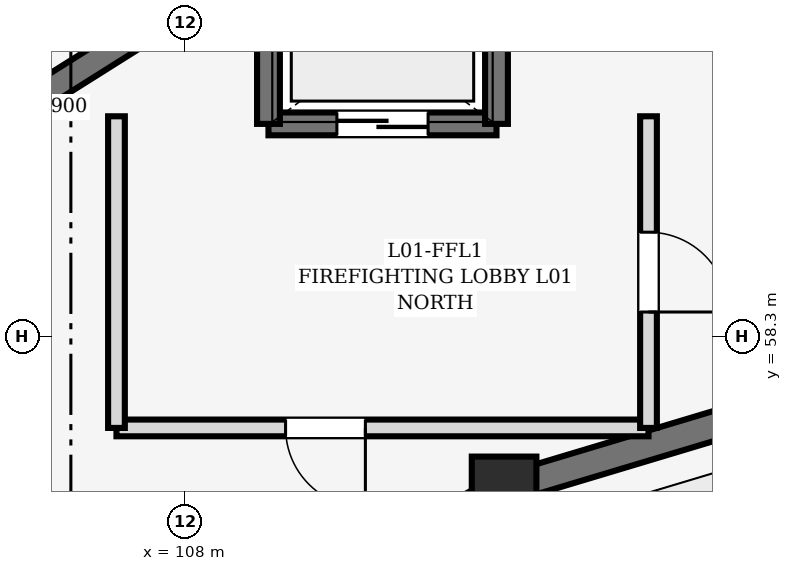
"""IFC4 building model, lengths in metres.
Left out: names, types, materials, properties, quantities, classifications, styles, units other than length and angle.
Written with IfcOpenShell. Run it as: python <this file> out.ifc"""

import sys

from ifc_helpers import new_model, si_unit, direction, frame, frame_2d, origin, origin_2d, place, context, subcontext, project, spatial, rectangle, extrude, element, fill, save


model = new_model("IFC4")
c1 = context("Model", 3, precision=1e-05, world=origin(), true_north=direction((0.0, 1.0)))
c2 = subcontext(c1, "Body", "Model", "MODEL_VIEW")
j1 = project(units=[si_unit("LENGTHUNIT", "METRE"), si_unit("PLANEANGLEUNIT", "RADIAN")], contexts=[c1])
p1 = place(None, origin())
s1 = spatial("IfcSite", under=j1, at=p1, CompositionType="ELEMENT")
p2 = place(p1, origin())
s2 = spatial("IfcBuilding", under=s1, at=p2, CompositionType="ELEMENT")
p3 = place(p2, origin())
s3 = spatial("IfcBuildingStorey", under=s2, at=p3, CompositionType="ELEMENT", Elevation=0.0)
p4 = place(p3, frame((112.2, 56.298, 0.0), z_axis=(0.0, 0.0, 1.0), x_axis=(1.0, 0.0, 0.0)))
e1 = element("IfcColumn", 1, at=p4, inside=s3, PredefinedType="COLUMN", context=c2, shape_type="SweptSolid", body=[
    extrude(rectangle(XDim=0.85, YDim=0.85, at=origin_2d()), origin(), (0.0, 0.0, 1.0), 5.4),
])
p5 = place(p3, frame((116.774, 57.67, 0.0), z_axis=(0.0, 0.0, 1.0), x_axis=(-0.957804976592, -0.287418904764, 0.0)))
e2 = element("IfcWall", 2, at=p5, inside=s3, PredefinedType="SOLIDWALL", context=c2, shape_type="SweptSolid", body=[
    extrude(rectangle(XDim=4.415, YDim=0.38, at=frame_2d((2.208, 0.0))), origin(), (0.0, 0.0, 1.0), 5.12),
])
p6 = place(p3, frame((111.885, 56.123, 0.0), z_axis=(0.0, 0.0, 1.0), x_axis=(-0.874000773635, -0.485924528795, 0.0)))
e3 = element("IfcWall", 3, at=p6, inside=s3, PredefinedType="SOLIDWALL", context=c2, shape_type="SweptSolid", body=[
    extrude(rectangle(XDim=3.975, YDim=0.38, at=frame_2d((1.987, 0.0))), origin(), (0.0, 0.0, 1.0), 5.12),
])
p7 = place(p3, frame((108.346, 62.893, 0.0), z_axis=(0.0, 0.0, 1.0), x_axis=(-0.846151979506, -0.532941673712, 0.0)))
e4 = element("IfcWall", 4, at=p7, inside=s3, PredefinedType="SHEAR", context=c2, shape_type="SweptSolid", body=[
    extrude(rectangle(XDim=5.9, YDim=0.35, at=frame_2d((2.95, 0.0))), origin(), (0.0, 0.0, 1.0), 5.12),
])
p8 = place(p3, frame((112.1, 61.1, 0.0), z_axis=(0.0, 0.0, 1.0), x_axis=(-1.0, 0.0, 0.0)))
e5 = element("IfcWall", 5, at=p8, inside=s3, PredefinedType="SHEAR", context=c2, shape_type="SweptSolid", body=[
    extrude(rectangle(XDim=3.0, YDim=0.3, at=frame_2d((1.5, 0.0))), origin(), (0.0, 0.0, 1.0), 5.14),
])
p9 = place(p8, frame((0.9, 0.0, 0.0)))
e6 = element("IfcOpeningElement", 6, at=p9, cuts=e5, PredefinedType="OPENING", context=c2, shape_type="SweptSolid", body=[
    extrude(rectangle(XDim=1.2, YDim=2.15, at=frame_2d((0.6, 1.075))), frame((0.0, 0.162, 0.0), z_axis=(0.0, -1.0, 0.0), x_axis=(1.0, 0.0, 0.0)), (0.0, 0.0, 1.0), 0.324),
])
p10 = place(p3, frame((112.1, 63.3, 0.0), z_axis=(0.0, 0.0, 1.0), x_axis=(0.0, -1.0, 0.0)))
e7 = element("IfcWall", 7, at=p10, inside=s3, PredefinedType="SHEAR", context=c2, shape_type="SweptSolid", body=[
    extrude(rectangle(XDim=2.2, YDim=0.3, at=frame_2d((1.1, 0.0))), origin(), (0.0, 0.0, 1.0), 5.14),
])
p11 = place(p3, frame((109.1, 61.1, 0.0), z_axis=(0.0, 0.0, 1.0), x_axis=(0.0, 1.0, 0.0)))
e8 = element("IfcWall", 8, at=p11, inside=s3, PredefinedType="SHEAR", context=c2, shape_type="SweptSolid", body=[
    extrude(rectangle(XDim=2.2, YDim=0.3, at=frame_2d((1.1, 0.0))), origin(), (0.0, 0.0, 1.0), 5.12),
])
p12 = place(p3, frame((114.1, 57.1, 0.0), z_axis=(0.0, 0.0, 1.0), x_axis=(-1.0, 0.0, 0.0)))
e9 = element("IfcWall", 9, at=p12, inside=s3, PredefinedType="SOLIDWALL", context=c2, shape_type="SweptSolid", body=[
    extrude(rectangle(XDim=7.0, YDim=0.22, at=frame_2d((3.5, 0.0))), origin(), (0.0, 0.0, 1.0), 5.125),
])
p13 = place(p12, frame((3.725, 0.0, 0.0)))
e10 = element("IfcOpeningElement", 10, at=p13, cuts=e9, PredefinedType="OPENING", context=c2, shape_type="SweptSolid", body=[
    extrude(rectangle(XDim=1.05, YDim=2.15, at=frame_2d((0.525, 1.075))), frame((0.0, 0.122, 0.0), z_axis=(0.0, -1.0, 0.0), x_axis=(1.0, 0.0, 0.0)), (0.0, 0.0, 1.0), 0.244),
])
p14 = place(p3, frame((107.1, 57.1, 0.0), z_axis=(0.0, 0.0, 1.0), x_axis=(0.0, 1.0, 0.0)))
e11 = element("IfcWall", 11, at=p14, inside=s3, PredefinedType="SOLIDWALL", context=c2, shape_type="SweptSolid", body=[
    extrude(rectangle(XDim=4.1, YDim=0.22, at=frame_2d((2.05, 0.0))), origin(), (0.0, 0.0, 1.0), 5.125),
])
p15 = place(p3, frame((114.1, 61.2, 0.0), z_axis=(0.0, 0.0, 1.0), x_axis=(0.0, -1.0, 0.0)))
e12 = element("IfcWall", 12, at=p15, inside=s3, PredefinedType="SOLIDWALL", context=c2, shape_type="SweptSolid", body=[
    extrude(rectangle(XDim=4.1, YDim=0.22, at=frame_2d((2.05, 0.0))), origin(), (0.0, 0.0, 1.0), 5.125),
])
p16 = place(p15, frame((1.525, 0.0, 0.0)))
e13 = element("IfcOpeningElement", 13, at=p16, cuts=e12, PredefinedType="OPENING", context=c2, shape_type="SweptSolid", body=[
    extrude(rectangle(XDim=1.05, YDim=2.15, at=frame_2d((0.525, 1.075))), frame((0.0, 0.122, 0.0), z_axis=(0.0, -1.0, 0.0), x_axis=(1.0, 0.0, 0.0)), (0.0, 0.0, 1.0), 0.244),
])
p17 = place(p9, origin())
e14 = element("IfcDoor", 14, at=p17, inside=s3, OperationType="DOUBLE_DOOR_SLIDING", PredefinedType="DOOR", context=c2, shape_type="SweptSolid", body=[
    extrude(rectangle(XDim=1.2, YDim=2.15, at=frame_2d((0.6, 1.075))), frame((0.0, 0.025, 0.0), z_axis=(0.0, -1.0, 0.0), x_axis=(1.0, 0.0, 0.0)), (0.0, 0.0, 1.0), 0.05),
])
fill(e6, e14)
p18 = place(p13, origin())
e15 = element("IfcDoor", 15, at=p18, inside=s3, OperationType="SINGLE_SWING_LEFT", PredefinedType="DOOR", context=c2, shape_type="SweptSolid", body=[
    extrude(rectangle(XDim=1.05, YDim=2.15, at=frame_2d((0.525, 1.075))), frame((0.0, 0.025, 0.0), z_axis=(0.0, -1.0, 0.0), x_axis=(1.0, 0.0, 0.0)), (0.0, 0.0, 1.0), 0.05),
])
fill(e10, e15)
p19 = place(p16, origin())
e16 = element("IfcDoor", 16, at=p19, inside=s3, OperationType="SINGLE_SWING_RIGHT", PredefinedType="DOOR", context=c2, shape_type="SweptSolid", body=[
    extrude(rectangle(XDim=1.05, YDim=2.15, at=frame_2d((0.525, 1.075))), frame((0.0, 0.025, 0.0), z_axis=(0.0, -1.0, 0.0), x_axis=(1.0, 0.0, 0.0)), (0.0, 0.0, 1.0), 0.05),
])
fill(e13, e16)
save(model, sys.argv[1])
